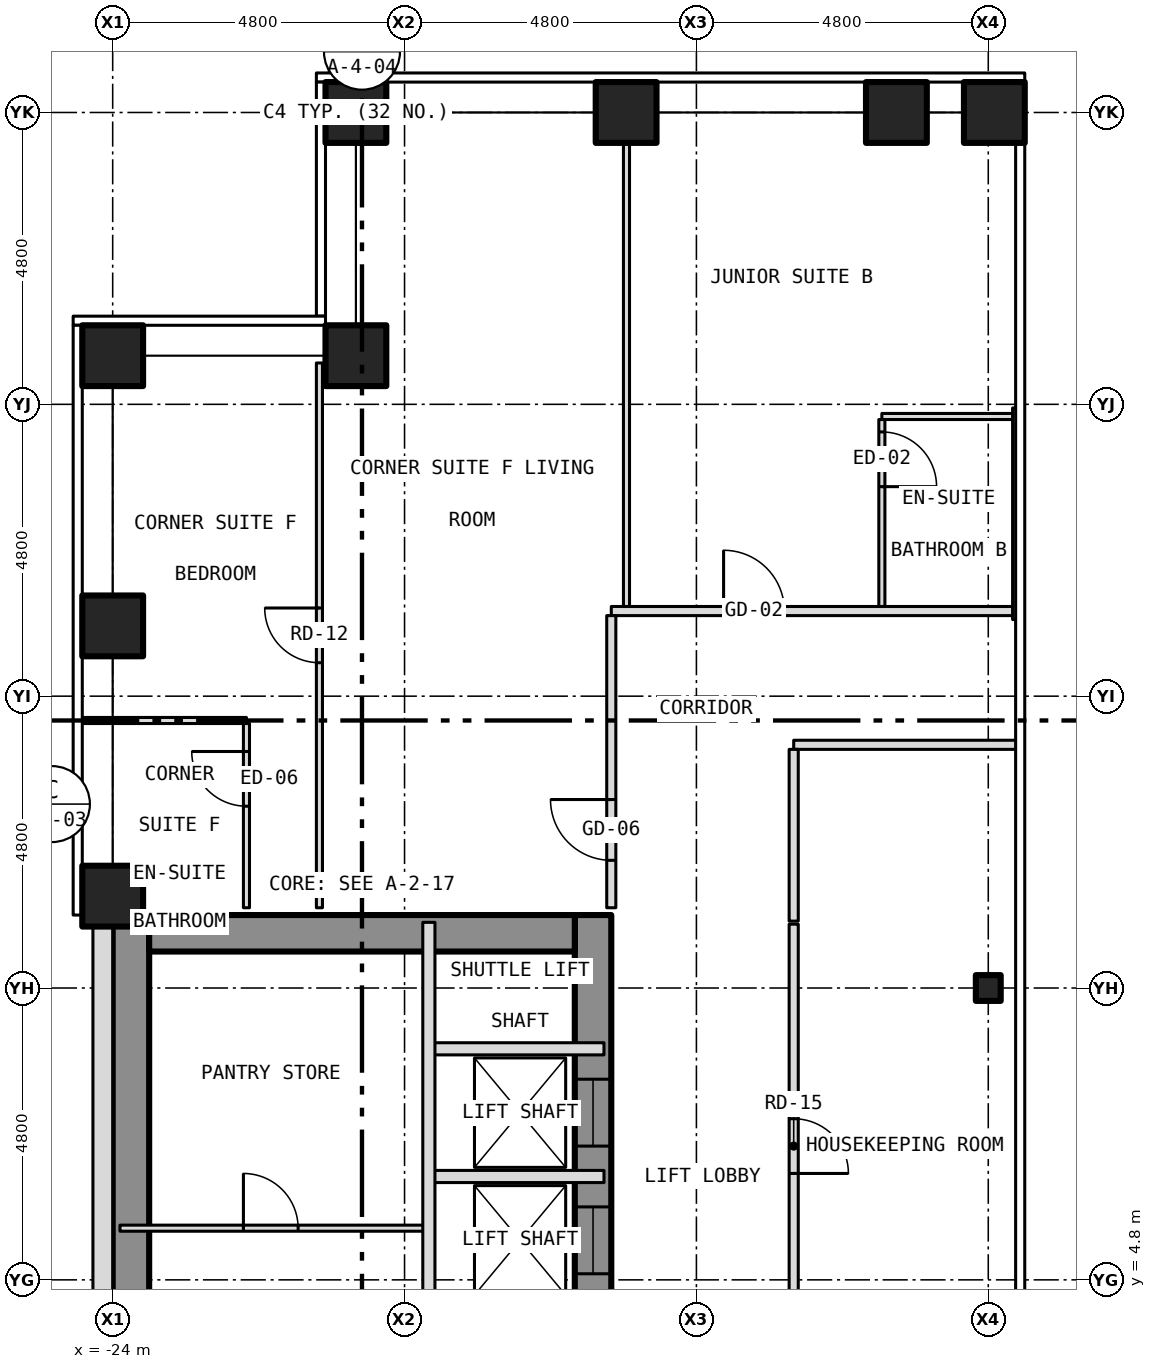
"""IFC4 building model, lengths in metres.
Left out: names, types, materials, properties, quantities, classifications, styles, units other than length and angle.
Written with IfcOpenShell. Run it as: python <this file> out.ifc"""

import sys

from ifc_helpers import new_model, si_unit, direction, frame, frame_2d, origin, origin_2d, place, context, subcontext, project, spatial, rectangle, hollow_rectangle, i_section, extrude, element, fill, save


model = new_model("IFC4")
c1 = context("Model", 3, precision=1e-05, world=origin(), true_north=direction((0.0, 1.0)))
c2 = subcontext(c1, "Body", "Model", "MODEL_VIEW")
j1 = project(units=[si_unit("LENGTHUNIT", "METRE"), si_unit("PLANEANGLEUNIT", "RADIAN")], contexts=[c1])
p1 = place(None, origin())
s1 = spatial("IfcSite", under=j1, at=p1, CompositionType="ELEMENT")
p2 = place(p1, origin())
s2 = spatial("IfcBuilding", under=s1, at=p2, CompositionType="ELEMENT")
p3 = place(p2, frame((0.0, 0.0, 63.5)))
s3 = spatial("IfcBuildingStorey", under=s2, at=p3, CompositionType="ELEMENT", Elevation=63.5)
for number, where, z_axis, x_axis in (
    (1, (-20.0, 24.0, -0.15), (0.0, 0.0, 1.0), (1.0, 0.0, 0.0)),
    (2, (-15.556, 24.0, -0.15), (0.0, 0.0, 1.0), (1.0, 0.0, 0.0)),
    (3, (-11.111, 24.0, -0.15), (0.0, 0.0, 1.0), (1.0, 0.0, 0.0)),
    (4, (-24.0, 11.111, -0.15), (0.0, 0.0, 1.0), (1.0, 0.0, 0.0)),
    (5, (-24.0, 15.556, -0.15), (0.0, 0.0, 1.0), (1.0, 0.0, 0.0)),
    (6, (-24.0, 20.0, -0.15), (0.0, 0.0, 1.0), (1.0, 0.0, 0.0)),
    (7, (-20.0, 20.0, -0.15), (0.0, 0.0, 1.0), (1.0, 0.0, 0.0)),
    (8, (-9.5, 24.0, -0.15), (0.0, 0.0, 1.0), (1.0, 0.0, 0.0)),
):
    element("IfcColumn", number, at=place(p3, frame(where, z_axis=z_axis, x_axis=x_axis)), inside=s3, PredefinedType="COLUMN", context=c2, shape_type="SweptSolid", body=[
        extrude(hollow_rectangle(XDim=1.0, YDim=1.0, WallThickness=0.06, at=origin_2d()), origin(), (0.0, 0.0, 1.0), 3.5),
    ])
p4 = place(p3, frame((-9.6, 9.6, -0.15), z_axis=(0.0, 0.0, 1.0), x_axis=(1.0, 0.0, 0.0)))
e9 = element("IfcColumn", 9, at=p4, inside=s3, PredefinedType="COLUMN", context=c2, shape_type="SweptSolid", body=[
    extrude(i_section(OverallWidth=0.409, OverallDepth=0.424, WebThickness=0.033, FlangeThickness=0.052, at=origin_2d()), origin(), (0.0, 0.0, 1.0), 3.5),
])
p5 = place(p3, frame((-16.1, -10.8, 0.0), z_axis=(0.0, 0.0, 1.0), x_axis=(0.0, 1.0, 0.0)))
e10 = element("IfcWall", 10, at=p5, inside=s3, PredefinedType="SHEAR", context=c2, shape_type="SweptSolid", body=[
    extrude(rectangle(XDim=21.6, YDim=0.6, at=frame_2d((10.8, 0.0))), origin(), (0.0, 0.0, 1.0), 3.25),
])
p6 = place(p5, frame((9.4, 0.0, 0.0)))
e11 = element("IfcOpeningElement", 11, at=p6, cuts=e10, PredefinedType="OPENING", context=c2, shape_type="SweptSolid", body=[
    extrude(rectangle(XDim=1.1, YDim=2.1, at=frame_2d((0.55, 1.05))), frame((0.0, 0.312, 0.0), z_axis=(0.0, -1.0, 0.0), x_axis=(1.0, 0.0, 0.0)), (0.0, 0.0, 1.0), 0.624),
])
p7 = place(p5, frame((11.5, 0.0, 0.0)))
e12 = element("IfcOpeningElement", 12, at=p7, cuts=e10, PredefinedType="OPENING", context=c2, shape_type="SweptSolid", body=[
    extrude(rectangle(XDim=1.1, YDim=2.1, at=frame_2d((0.55, 1.05))), frame((0.0, 0.312, 0.0), z_axis=(0.0, -1.0, 0.0), x_axis=(1.0, 0.0, 0.0)), (0.0, 0.0, 1.0), 0.624),
])
p8 = place(p5, frame((13.6, 0.0, 0.0)))
e13 = element("IfcOpeningElement", 13, at=p8, cuts=e10, PredefinedType="OPENING", context=c2, shape_type="SweptSolid", body=[
    extrude(rectangle(XDim=1.1, YDim=2.1, at=frame_2d((0.55, 1.05))), frame((0.0, 0.312, 0.0), z_axis=(0.0, -1.0, 0.0), x_axis=(1.0, 0.0, 0.0)), (0.0, 0.0, 1.0), 0.624),
])
p9 = place(p5, frame((15.7, 0.0, 0.0)))
e14 = element("IfcOpeningElement", 14, at=p9, cuts=e10, PredefinedType="OPENING", context=c2, shape_type="SweptSolid", body=[
    extrude(rectangle(XDim=1.1, YDim=2.1, at=frame_2d((0.55, 1.05))), frame((0.0, 0.312, 0.0), z_axis=(0.0, -1.0, 0.0), x_axis=(1.0, 0.0, 0.0)), (0.0, 0.0, 1.0), 0.624),
])
p10 = place(p5, frame((17.8, 0.0, 0.0)))
e15 = element("IfcOpeningElement", 15, at=p10, cuts=e10, PredefinedType="OPENING", context=c2, shape_type="SweptSolid", body=[
    extrude(rectangle(XDim=1.1, YDim=2.1, at=frame_2d((0.55, 1.05))), frame((0.0, 0.312, 0.0), z_axis=(0.0, -1.0, 0.0), x_axis=(1.0, 0.0, 0.0)), (0.0, 0.0, 1.0), 0.624),
])
p11 = place(p5, frame((0.758, 0.0, 0.0)))
e16 = element("IfcOpeningElement", 16, at=p11, cuts=e10, PredefinedType="OPENING", context=c2, shape_type="SweptSolid", body=[
    extrude(rectangle(XDim=1.1, YDim=2.1, at=frame_2d((0.55, 1.05))), frame((0.0, 0.312, 0.0), z_axis=(0.0, -1.0, 0.0), x_axis=(1.0, 0.0, 0.0)), (0.0, 0.0, 1.0), 0.624),
])
p12 = place(p5, frame((7.5, 0.0, 0.0)))
e17 = element("IfcOpeningElement", 17, at=p12, cuts=e10, PredefinedType="OPENING", context=c2, shape_type="SweptSolid", body=[
    extrude(rectangle(XDim=1.1, YDim=2.1, at=frame_2d((0.55, 1.05))), frame((0.0, 0.312, 0.0), z_axis=(0.0, -1.0, 0.0), x_axis=(1.0, 0.0, 0.0)), (0.0, 0.0, 1.0), 0.624),
])
p13 = place(p3, frame((-23.7, -10.8, 0.0), z_axis=(0.0, 0.0, 1.0), x_axis=(0.0, 1.0, 0.0)))
e18 = element("IfcWall", 18, at=p13, inside=s3, PredefinedType="SHEAR", context=c2, shape_type="SweptSolid", body=[
    extrude(rectangle(XDim=21.6, YDim=0.6, at=frame_2d((10.8, 0.0))), origin(), (0.0, 0.0, 1.0), 3.25),
])
p14 = place(p3, frame((-23.4, 10.5, 0.0), z_axis=(0.0, 0.0, 1.0), x_axis=(1.0, 0.0, 0.0)))
e19 = element("IfcWall", 19, at=p14, inside=s3, PredefinedType="SHEAR", context=c2, shape_type="SweptSolid", body=[
    extrude(rectangle(XDim=7.0, YDim=0.6, at=frame_2d((3.5, 0.0))), origin(), (0.0, 0.0, 1.0), 3.25),
])
p15 = place(p3, frame((-24.163, 10.8, 0.0), z_axis=(0.0, 0.0, 1.0), x_axis=(0.0, -1.0, 0.0)))
e20 = element("IfcWall", 20, at=p15, inside=s3, PredefinedType="SOLIDWALL", context=c2, shape_type="SweptSolid", body=[
    extrude(rectangle(XDim=21.6, YDim=0.325, at=frame_2d((10.8, 0.0))), origin(), (0.0, 0.0, 1.0), 3.5),
])
p16 = place(p15, frame((18.05, 0.0, 1.0)))
e21 = element("IfcOpeningElement", 21, at=p16, cuts=e20, PredefinedType="OPENING", context=c2, shape_type="SweptSolid", body=[
    extrude(rectangle(XDim=0.6, YDim=1.5, at=frame_2d((0.3, 0.75))), frame((0.0, 0.175, 0.0), z_axis=(0.0, -1.0, 0.0), x_axis=(1.0, 0.0, 0.0)), (0.0, 0.0, 1.0), 0.349),
])
p17 = place(p3, frame((-23.88, 5.65, 0.0), z_axis=(0.0, 0.0, 1.0), x_axis=(1.0, 0.0, 0.0)))
e22 = element("IfcWall", 22, at=p17, inside=s3, PredefinedType="PARTITIONING", context=c2, shape_type="SweptSolid", body=[
    extrude(rectangle(XDim=5.08, YDim=0.1, at=frame_2d((2.54, 0.0))), origin(), (0.0, 0.0, 1.0), 3.25),
])
p18 = place(p17, frame((2.03, 0.0, 0.0)))
e23 = element("IfcOpeningElement", 23, at=p18, cuts=e22, PredefinedType="OPENING", context=c2, shape_type="SweptSolid", body=[
    extrude(rectangle(XDim=0.9, YDim=2.1, at=frame_2d((0.45, 1.05))), frame((0.0, 0.062, 0.0), z_axis=(0.0, -1.0, 0.0), x_axis=(1.0, 0.0, 0.0)), (0.0, 0.0, 1.0), 0.124),
])
for number, where, z_axis, x_axis in (
    (24, (-18.8, 6.5, 0.0), (0.0, 0.0, 1.0), (1.0, 0.0, 0.0)),
    (25, (-18.8, 8.6, 0.0), (0.0, 0.0, 1.0), (1.0, 0.0, 0.0)),
):
    element("IfcWall", number, at=place(p3, frame(where, z_axis=z_axis, x_axis=x_axis)), inside=s3, PredefinedType="PARTITIONING", context=c2, shape_type="SweptSolid", body=[
        extrude(rectangle(XDim=2.88, YDim=0.2, at=frame_2d((1.44, 0.0))), origin(), (0.0, 0.0, 1.0), 3.25),
    ])
p19 = place(p3, frame((-12.8, 13.6, 0.0), z_axis=(0.0, 0.0, 1.0), x_axis=(1.0, 0.0, 0.0)))
e26 = element("IfcWall", 26, at=p19, inside=s3, PredefinedType="PARTITIONING", context=c2, shape_type="SweptSolid", body=[
    extrude(rectangle(XDim=3.68, YDim=0.15, at=frame_2d((1.84, 0.0))), origin(), (0.0, 0.0, 1.0), 3.35),
])
p20 = place(p3, frame((-24.53, 14.0, 0.0), z_axis=(0.0, 0.0, 1.0), x_axis=(1.0, 0.0, 0.0)))
e27 = element("IfcWall", 27, at=p20, inside=s3, PredefinedType="PARTITIONING", context=c2, shape_type="SweptSolid", body=[
    extrude(rectangle(XDim=2.73, YDim=0.1, at=frame_2d((1.365, 0.0))), origin(), (0.0, 0.0, 1.0), 3.35),
])
p21 = place(p3, frame((-15.8, 15.8, 0.0), z_axis=(0.0, 0.0, 1.0), x_axis=(1.0, 0.0, 0.0)))
e28 = element("IfcWall", 28, at=p21, inside=s3, PredefinedType="PARTITIONING", context=c2, shape_type="SweptSolid", body=[
    extrude(rectangle(XDim=6.65, YDim=0.15, at=frame_2d((3.325, 0.0))), origin(), (0.0, 0.0, 1.0), 3.35),
])
p22 = place(p21, frame((1.847, 0.0, 0.0)))
e29 = element("IfcOpeningElement", 29, at=p22, cuts=e28, PredefinedType="OPENING", context=c2, shape_type="SweptSolid", body=[
    extrude(rectangle(XDim=1.0, YDim=2.1, at=frame_2d((0.5, 1.05))), frame((0.0, 0.087, 0.0), z_axis=(0.0, -1.0, 0.0), x_axis=(1.0, 0.0, 0.0)), (0.0, 0.0, 1.0), 0.174),
])
p23 = place(p3, frame((-11.35, 19.0, 0.0), z_axis=(0.0, 0.0, 1.0), x_axis=(1.0, 0.0, 0.0)))
e30 = element("IfcWall", 30, at=p23, inside=s3, PredefinedType="PARTITIONING", context=c2, shape_type="SweptSolid", body=[
    extrude(rectangle(XDim=2.2, YDim=0.1, at=frame_2d((1.1, 0.0))), origin(), (0.0, 0.0, 1.0), 3.35),
])
p24 = place(p3, frame((-21.8, 10.92, 0.0), z_axis=(0.0, 0.0, 1.0), x_axis=(0.0, 1.0, 0.0)))
e31 = element("IfcWall", 31, at=p24, inside=s3, PredefinedType="PARTITIONING", context=c2, shape_type="SweptSolid", body=[
    extrude(rectangle(XDim=3.03, YDim=0.1, at=frame_2d((1.515, 0.0))), origin(), (0.0, 0.0, 1.0), 3.35),
])
p25 = place(p24, frame((1.67, 0.0, 0.0)))
e32 = element("IfcOpeningElement", 32, at=p25, cuts=e31, PredefinedType="OPENING", context=c2, shape_type="SweptSolid", body=[
    extrude(rectangle(XDim=0.9, YDim=2.1, at=frame_2d((0.45, 1.05))), frame((0.0, 0.062, 0.0), z_axis=(0.0, -1.0, 0.0), x_axis=(1.0, 0.0, 0.0)), (0.0, 0.0, 1.0), 0.124),
])
p26 = place(p3, frame((-20.6, 10.92, 0.0), z_axis=(0.0, 0.0, 1.0), x_axis=(0.0, 1.0, 0.0)))
e33 = element("IfcWall", 33, at=p26, inside=s3, PredefinedType="PARTITIONING", context=c2, shape_type="SweptSolid", body=[
    extrude(rectangle(XDim=8.96, YDim=0.1, at=frame_2d((4.48, 0.0))), origin(), (0.0, 0.0, 1.0), 3.35),
])
p27 = place(p26, frame((4.03, 0.0, 0.0)))
e34 = element("IfcOpeningElement", 34, at=p27, cuts=e33, PredefinedType="OPENING", context=c2, shape_type="SweptSolid", body=[
    extrude(rectangle(XDim=0.9, YDim=2.1, at=frame_2d((0.45, 1.05))), frame((0.0, 0.062, 0.0), z_axis=(0.0, -1.0, 0.0), x_axis=(1.0, 0.0, 0.0)), (0.0, 0.0, 1.0), 0.124),
])
p28 = place(p3, frame((-18.8, -1.8, 0.0), z_axis=(0.0, 0.0, 1.0), x_axis=(0.0, 1.0, 0.0)))
e35 = element("IfcWall", 35, at=p28, inside=s3, PredefinedType="PARTITIONING", context=c2, shape_type="SweptSolid", body=[
    extrude(rectangle(XDim=12.48, YDim=0.2, at=frame_2d((6.24, 0.0))), origin(), (0.0, 0.0, 1.0), 3.25),
])
p29 = place(p3, frame((-15.8, 10.92, 0.0), z_axis=(0.0, 0.0, 1.0), x_axis=(0.0, 1.0, 0.0)))
e36 = element("IfcWall", 36, at=p29, inside=s3, PredefinedType="PARTITIONING", context=c2, shape_type="SweptSolid", body=[
    extrude(rectangle(XDim=4.805, YDim=0.15, at=frame_2d((2.403, 0.0))), origin(), (0.0, 0.0, 1.0), 3.35),
])
p30 = place(p29, frame((0.78, 0.0, 0.0)))
e37 = element("IfcOpeningElement", 37, at=p30, cuts=e36, PredefinedType="OPENING", context=c2, shape_type="SweptSolid", body=[
    extrude(rectangle(XDim=1.0, YDim=2.1, at=frame_2d((0.5, 1.05))), frame((0.0, 0.087, 0.0), z_axis=(0.0, -1.0, 0.0), x_axis=(1.0, 0.0, 0.0)), (0.0, 0.0, 1.0), 0.174),
])
p31 = place(p3, frame((-15.55, 15.875, 0.0), z_axis=(0.0, 0.0, 1.0), x_axis=(0.0, 1.0, 0.0)))
e38 = element("IfcWall", 38, at=p31, inside=s3, PredefinedType="PARTITIONING", context=c2, shape_type="SweptSolid", body=[
    extrude(rectangle(XDim=8.005, YDim=0.1, at=frame_2d((4.002, 0.0))), origin(), (0.0, 0.0, 1.0), 3.35),
])
p32 = place(p3, frame((-12.8, 3.375, 0.0), z_axis=(0.0, 0.0, 1.0), x_axis=(0.0, 1.0, 0.0)))
e39 = element("IfcWall", 39, at=p32, inside=s3, PredefinedType="PARTITIONING", context=c2, shape_type="SweptSolid", body=[
    extrude(rectangle(XDim=7.275, YDim=0.15, at=frame_2d((3.637, 0.0))), origin(), (0.0, 0.0, 1.0), 3.35),
])
p33 = place(p32, frame((3.175, 0.0, 0.0)))
e40 = element("IfcOpeningElement", 40, at=p33, cuts=e39, PredefinedType="OPENING", context=c2, shape_type="SweptSolid", body=[
    extrude(rectangle(XDim=0.9, YDim=2.1, at=frame_2d((0.45, 1.05))), frame((0.0, 0.087, 0.0), z_axis=(0.0, -1.0, 0.0), x_axis=(1.0, 0.0, 0.0)), (0.0, 0.0, 1.0), 0.174),
])
p34 = place(p3, frame((-12.8, 10.7, 0.0), z_axis=(0.0, 0.0, 1.0), x_axis=(0.0, 1.0, 0.0)))
e41 = element("IfcWall", 41, at=p34, inside=s3, PredefinedType="PARTITIONING", context=c2, shape_type="SweptSolid", body=[
    extrude(rectangle(XDim=2.825, YDim=0.15, at=frame_2d((1.413, 0.0))), origin(), (0.0, 0.0, 1.0), 3.35),
])
p35 = place(p3, frame((-11.35, 15.875, 0.0), z_axis=(0.0, 0.0, 1.0), x_axis=(0.0, 1.0, 0.0)))
e42 = element("IfcWall", 42, at=p35, inside=s3, PredefinedType="PARTITIONING", context=c2, shape_type="SweptSolid", body=[
    extrude(rectangle(XDim=3.075, YDim=0.1, at=frame_2d((1.538, 0.0))), origin(), (0.0, 0.0, 1.0), 3.35),
])
p36 = place(p35, frame((1.971, 0.0, 0.0)))
e43 = element("IfcOpeningElement", 43, at=p36, cuts=e42, PredefinedType="OPENING", context=c2, shape_type="SweptSolid", body=[
    extrude(rectangle(XDim=0.9, YDim=2.1, at=frame_2d((0.45, 1.05))), frame((0.0, 0.062, 0.0), z_axis=(0.0, -1.0, 0.0), x_axis=(1.0, 0.0, 0.0)), (0.0, 0.0, 1.0), 0.124),
])
p37 = place(p3, frame((-9.15, 15.66, 0.0), z_axis=(0.0, 0.0, 1.0), x_axis=(0.0, 1.0, 0.0)))
e44 = element("IfcWall", 44, at=p37, inside=s3, PredefinedType="PARTITIONING", context=c2, shape_type="SweptSolid", body=[
    extrude(rectangle(XDim=3.48, YDim=0.1, at=frame_2d((1.74, 0.0))), origin(), (0.0, 0.0, 1.0), 2.733),
])
p38 = place(p9, origin())
e45 = element("IfcDoor", 45, at=p38, inside=s3, OperationType="SLIDING_TO_LEFT", PredefinedType="DOOR", context=c2, shape_type="SweptSolid", body=[
    extrude(rectangle(XDim=1.1, YDim=2.1, at=frame_2d((0.55, 1.05))), frame((0.0, 0.025, 0.0), z_axis=(0.0, -1.0, 0.0), x_axis=(1.0, 0.0, 0.0)), (0.0, 0.0, 1.0), 0.05),
])
fill(e14, e45)
p39 = place(p10, origin())
e46 = element("IfcDoor", 46, at=p39, inside=s3, OperationType="SLIDING_TO_LEFT", PredefinedType="DOOR", context=c2, shape_type="SweptSolid", body=[
    extrude(rectangle(XDim=1.1, YDim=2.1, at=frame_2d((0.55, 1.05))), frame((0.0, 0.025, 0.0), z_axis=(0.0, -1.0, 0.0), x_axis=(1.0, 0.0, 0.0)), (0.0, 0.0, 1.0), 0.05),
])
fill(e15, e46)
p40 = place(p18, origin())
e47 = element("IfcDoor", 47, at=p40, inside=s3, OperationType="SINGLE_SWING_LEFT", PredefinedType="DOOR", context=c2, shape_type="SweptSolid", body=[
    extrude(rectangle(XDim=0.9, YDim=2.1, at=frame_2d((0.45, 1.05))), frame((0.0, 0.025, 0.0), z_axis=(0.0, -1.0, 0.0), x_axis=(1.0, 0.0, 0.0)), (0.0, 0.0, 1.0), 0.05),
])
fill(e23, e47)
p41 = place(p22, origin())
e48 = element("IfcDoor", 48, at=p41, inside=s3, OperationType="SINGLE_SWING_LEFT", PredefinedType="DOOR", context=c2, shape_type="SweptSolid", body=[
    extrude(rectangle(XDim=1.0, YDim=2.1, at=frame_2d((0.5, 1.05))), frame((0.0, 0.025, 0.0), z_axis=(0.0, -1.0, 0.0), x_axis=(1.0, 0.0, 0.0)), (0.0, 0.0, 1.0), 0.05),
])
fill(e29, e48)
p42 = place(p36, origin())
e49 = element("IfcDoor", 49, at=p42, inside=s3, OperationType="SINGLE_SWING_LEFT", PredefinedType="DOOR", context=c2, shape_type="SweptSolid", body=[
    extrude(rectangle(XDim=0.9, YDim=2.1, at=frame_2d((0.45, 1.05))), frame((0.0, 0.025, 0.0), z_axis=(0.0, -1.0, 0.0), x_axis=(1.0, 0.0, 0.0)), (0.0, 0.0, 1.0), 0.05),
])
fill(e43, e49)
p43 = place(p30, origin())
e50 = element("IfcDoor", 50, at=p43, inside=s3, OperationType="SINGLE_SWING_RIGHT", PredefinedType="DOOR", context=c2, shape_type="SweptSolid", body=[
    extrude(rectangle(XDim=1.0, YDim=2.1, at=frame_2d((0.5, 1.05))), frame((0.0, 0.025, 0.0), z_axis=(0.0, -1.0, 0.0), x_axis=(1.0, 0.0, 0.0)), (0.0, 0.0, 1.0), 0.05),
])
fill(e37, e50)
p44 = place(p27, origin())
e51 = element("IfcDoor", 51, at=p44, inside=s3, OperationType="SINGLE_SWING_RIGHT", PredefinedType="DOOR", context=c2, shape_type="SweptSolid", body=[
    extrude(rectangle(XDim=0.9, YDim=2.1, at=frame_2d((0.45, 1.05))), frame((0.0, 0.025, 0.0), z_axis=(0.0, -1.0, 0.0), x_axis=(1.0, 0.0, 0.0)), (0.0, 0.0, 1.0), 0.05),
])
fill(e34, e51)
p45 = place(p25, origin())
e52 = element("IfcDoor", 52, at=p45, inside=s3, OperationType="SINGLE_SWING_RIGHT", PredefinedType="DOOR", context=c2, shape_type="SweptSolid", body=[
    extrude(rectangle(XDim=0.9, YDim=2.1, at=frame_2d((0.45, 1.05))), frame((0.0, 0.025, 0.0), z_axis=(0.0, -1.0, 0.0), x_axis=(1.0, 0.0, 0.0)), (0.0, 0.0, 1.0), 0.05),
])
fill(e32, e52)
p46 = place(p33, origin())
e53 = element("IfcDoor", 53, at=p46, inside=s3, OperationType="SINGLE_SWING_LEFT", PredefinedType="DOOR", context=c2, shape_type="SweptSolid", body=[
    extrude(rectangle(XDim=0.9, YDim=2.1, at=frame_2d((0.45, 1.05))), frame((0.0, 0.025, 0.0), z_axis=(0.0, -1.0, 0.0), x_axis=(1.0, 0.0, 0.0)), (0.0, 0.0, 1.0), 0.05),
])
fill(e40, e53)
save(model, sys.argv[1])
